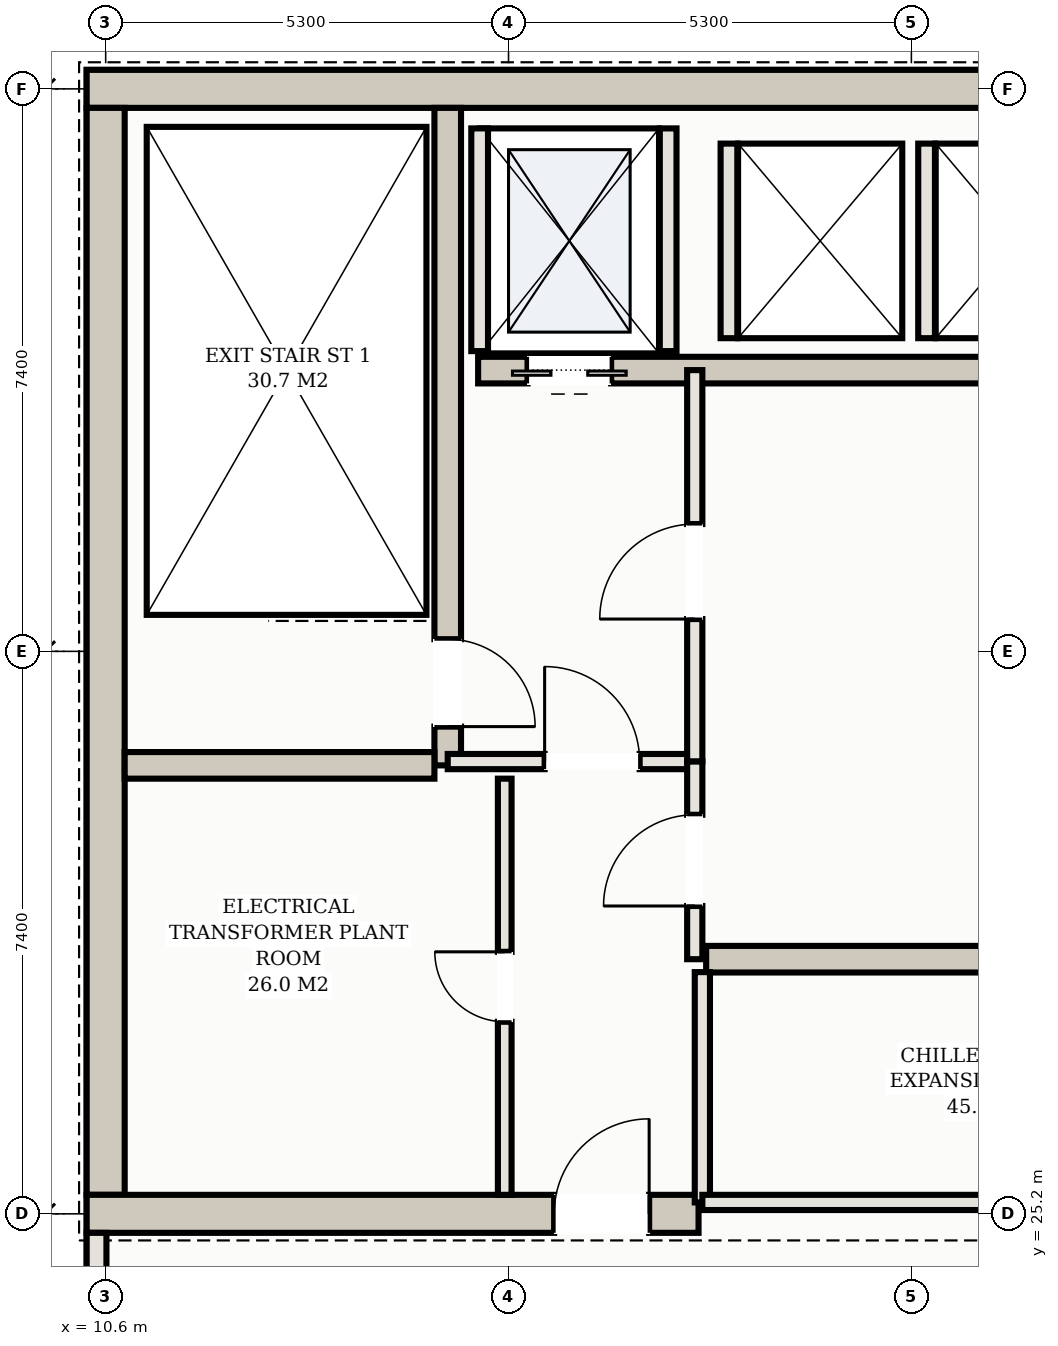
"""IFC4 building model, lengths in metres.
Left out: names, types, materials, properties, quantities, classifications, styles, units other than length and angle.
Written with IfcOpenShell. Run it as: python <this file> out.ifc"""

import sys

from ifc_helpers import new_model, si_unit, direction, frame, frame_2d, origin, place, context, subcontext, project, spatial, rectangle, extrude, element, fill, save


model = new_model("IFC4")
c1 = context("Model", 3, precision=1e-05, world=origin(), true_north=direction((0.0, 1.0)))
c2 = subcontext(c1, "Body", "Model", "MODEL_VIEW")
j1 = project(units=[si_unit("LENGTHUNIT", "METRE"), si_unit("PLANEANGLEUNIT", "RADIAN")], contexts=[c1])
p1 = place(None, origin())
s1 = spatial("IfcSite", under=j1, at=p1, CompositionType="ELEMENT")
p2 = place(p1, origin())
s2 = spatial("IfcBuilding", under=s1, at=p2, CompositionType="ELEMENT")
p3 = place(p2, frame((0.0, 0.0, 270.8)))
s3 = spatial("IfcBuildingStorey", under=s2, at=p3, CompositionType="ELEMENT", Elevation=270.8)
p4 = place(p3, frame((10.35, 40.0, 0.0), z_axis=(0.0, 0.0, 1.0), x_axis=(1.0, 0.0, 0.0)))
e1 = element("IfcWall", 1, at=p4, inside=s3, PredefinedType="SHEAR", context=c2, shape_type="SweptSolid", body=[
    extrude(rectangle(XDim=32.3, YDim=0.5, at=frame_2d((16.15, 0.0))), origin(), (0.0, 0.0, 1.0), 6.177),
])
p5 = place(p3, frame((10.6, 25.45, 0.0), z_axis=(0.0, 0.0, 1.0), x_axis=(0.0, 1.0, 0.0)))
e2 = element("IfcWall", 2, at=p5, inside=s3, PredefinedType="SHEAR", context=c2, shape_type="SweptSolid", body=[
    extrude(rectangle(XDim=14.3, YDim=0.5, at=frame_2d((7.15, 0.0))), origin(), (0.0, 0.0, 1.0), 6.239),
])
p6 = place(p3, frame((10.35, 25.2, 0.0), z_axis=(0.0, 0.0, 1.0), x_axis=(1.0, 0.0, 0.0)))
e3 = element("IfcWall", 3, at=p6, inside=s3, PredefinedType="SHEAR", context=c2, shape_type="SweptSolid", body=[
    extrude(rectangle(XDim=8.05, YDim=0.5, at=frame_2d((4.025, 0.0))), origin(), (0.0, 0.0, 1.0), 6.177),
])
p7 = place(p6, frame((6.15, 0.0, 0.0)))
e4 = element("IfcOpeningElement", 4, at=p7, cuts=e3, PredefinedType="OPENING", context=c2, shape_type="SweptSolid", body=[
    extrude(rectangle(XDim=1.25, YDim=2.2, at=frame_2d((0.625, 1.1))), frame((0.0, 0.26, 0.0), z_axis=(0.0, -1.0, 0.0), x_axis=(1.0, 0.0, 0.0)), (0.0, 0.0, 1.0), 0.52),
])
p8 = place(p3, frame((15.1, 31.1, 0.0), z_axis=(0.0, 0.0, 1.0), x_axis=(0.0, 1.0, 0.0)))
e5 = element("IfcWall", 5, at=p8, inside=s3, PredefinedType="SHEAR", context=c2, shape_type="SweptSolid", body=[
    extrude(rectangle(XDim=8.65, YDim=0.35, at=frame_2d((4.325, 0.0))), origin(), (0.0, 0.0, 1.0), 7.361),
])
p9 = place(p8, frame((0.51, 0.0, 0.0)))
e6 = element("IfcOpeningElement", 6, at=p9, cuts=e5, PredefinedType="OPENING", context=c2, shape_type="SweptSolid", body=[
    extrude(rectangle(XDim=1.15, YDim=2.2, at=frame_2d((0.575, 1.1))), frame((0.0, 0.185, 0.0), z_axis=(0.0, -1.0, 0.0), x_axis=(1.0, 0.0, 0.0)), (0.0, 0.0, 1.0), 0.37),
])
p10 = place(p3, frame((10.85, 31.1, 0.0), z_axis=(0.0, 0.0, 1.0), x_axis=(1.0, 0.0, 0.0)))
e7 = element("IfcWall", 7, at=p10, inside=s3, PredefinedType="SHEAR", context=c2, shape_type="SweptSolid", body=[
    extrude(rectangle(XDim=4.075, YDim=0.35, at=frame_2d((2.038, 0.0))), origin(), (0.0, 0.0, 1.0), 6.302),
])
p11 = place(p3, frame((15.5, 36.3, 0.0), z_axis=(0.0, 0.0, 1.0), x_axis=(1.0, 0.0, 0.0)))
e8 = element("IfcWall", 8, at=p11, inside=s3, PredefinedType="SHEAR", context=c2, shape_type="SweptSolid", body=[
    extrude(rectangle(XDim=22.0, YDim=0.35, at=frame_2d((11.0, 0.0))), origin(), (0.0, 0.0, 1.0), 7.461),
])
p12 = place(p11, frame((0.65, 0.0, 0.0)))
e9 = element("IfcOpeningElement", 9, at=p12, cuts=e8, PredefinedType="OPENING", context=c2, shape_type="SweptSolid", body=[
    extrude(rectangle(XDim=1.1, YDim=2.15, at=frame_2d((0.55, 1.075))), frame((0.0, 0.185, 0.0), z_axis=(0.0, -1.0, 0.0), x_axis=(1.0, 0.0, 0.0)), (0.0, 0.0, 1.0), 0.37),
])
p13 = place(p11, frame((20.25, 0.0, 0.0)))
e10 = element("IfcOpeningElement", 10, at=p13, cuts=e8, PredefinedType="OPENING", context=c2, shape_type="SweptSolid", body=[
    extrude(rectangle(XDim=1.1, YDim=2.15, at=frame_2d((0.55, 1.075))), frame((0.0, 0.185, 0.0), z_axis=(0.0, -1.0, 0.0), x_axis=(1.0, 0.0, 0.0)), (0.0, 0.0, 1.0), 0.37),
])
p14 = place(p11, frame((17.05, 0.0, 0.0)))
e11 = element("IfcOpeningElement", 11, at=p14, cuts=e8, PredefinedType="OPENING", context=c2, shape_type="SweptSolid", body=[
    extrude(rectangle(XDim=1.3, YDim=2.2, at=frame_2d((0.65, 1.1))), frame((0.0, 0.185, 0.0), z_axis=(0.0, -1.0, 0.0), x_axis=(1.0, 0.0, 0.0)), (0.0, 0.0, 1.0), 0.37),
])
p15 = place(p3, frame((18.5, 28.55, 0.0), z_axis=(0.0, 0.0, 1.0), x_axis=(1.0, 0.0, 0.0)))
e12 = element("IfcWall", 12, at=p15, inside=s3, PredefinedType="SHEAR", context=c2, shape_type="SweptSolid", body=[
    extrude(rectangle(XDim=16.0, YDim=0.35, at=frame_2d((8.0, 0.0))), origin(), (0.0, 0.0, 1.0), 8.209),
])
for number, where, z_axis, x_axis in (
    (13, (15.52, 36.55, 0.0), (0.0, 0.0, 1.0), (0.0, 1.0, 0.0)),
    (14, (18.0, 36.55, 0.0), (0.0, 0.0, 1.0), (0.0, 1.0, 0.0)),
):
    element("IfcWall", number, at=place(p3, frame(where, z_axis=z_axis, x_axis=x_axis)), inside=s3, PredefinedType="SOLIDWALL", context=c2, shape_type="SweptSolid", body=[
        extrude(rectangle(XDim=2.93, YDim=0.22, at=frame_2d((1.465, 0.0))), origin(), (0.0, 0.0, 1.0), 7.375),
    ])
p16 = place(p3, frame((18.8, 36.72, 0.0), z_axis=(0.0, 0.0, 1.0), x_axis=(0.0, 1.0, 0.0)))
e15 = element("IfcWall", 15, at=p16, inside=s3, PredefinedType="SOLIDWALL", context=c2, shape_type="SweptSolid", body=[
    extrude(rectangle(XDim=2.56, YDim=0.22, at=frame_2d((1.28, 0.0))), origin(), (0.0, 0.0, 1.0), 8.223),
])
p17 = place(p3, frame((21.4, 36.72, 0.0), z_axis=(0.0, 0.0, 1.0), x_axis=(0.0, 1.0, 0.0)))
e16 = element("IfcWall", 16, at=p17, inside=s3, PredefinedType="SOLIDWALL", context=c2, shape_type="SweptSolid", body=[
    extrude(rectangle(XDim=2.56, YDim=0.22, at=frame_2d((1.28, 0.0))), origin(), (0.0, 0.0, 1.0), 8.871),
])
p18 = place(p3, frame((10.48, 24.95, 0.0), z_axis=(0.0, 0.0, 1.0), x_axis=(0.0, -1.0, 0.0)))
e17 = element("IfcWall", 17, at=p18, inside=s3, PredefinedType="SOLIDWALL", context=c2, shape_type="SweptSolid", body=[
    extrude(rectangle(XDim=7.89, YDim=0.26, at=frame_2d((3.945, 0.0))), origin(), (0.0, 0.0, 1.0), 6.116),
])
p19 = place(p3, frame((15.1, 31.15, 0.0), z_axis=(0.0, 0.0, 1.0), x_axis=(1.0, 0.0, 0.0)))
e18 = element("IfcWall", 18, at=p19, inside=s3, PredefinedType="PARTITIONING", context=c2, shape_type="SweptSolid", body=[
    extrude(rectangle(XDim=3.25, YDim=0.2, at=frame_2d((1.625, 0.0))), origin(), (0.0, 0.0, 1.0), 5.98),
])
p20 = place(p19, frame((1.275, 0.0, 0.0)))
e19 = element("IfcOpeningElement", 19, at=p20, cuts=e18, PredefinedType="OPENING", context=c2, shape_type="SweptSolid", body=[
    extrude(rectangle(XDim=1.25, YDim=2.2, at=frame_2d((0.625, 1.1))), frame((0.0, 0.11, 0.0), z_axis=(0.0, -1.0, 0.0), x_axis=(1.0, 0.0, 0.0)), (0.0, 0.0, 1.0), 0.22),
])
p21 = place(p3, frame((18.35, 31.15, 0.0), z_axis=(0.0, 0.0, 1.0), x_axis=(0.0, 1.0, 0.0)))
e20 = element("IfcWall", 20, at=p21, inside=s3, PredefinedType="PARTITIONING", context=c2, shape_type="SweptSolid", body=[
    extrude(rectangle(XDim=5.15, YDim=0.2, at=frame_2d((2.575, 0.0))), origin(), (0.0, 0.0, 1.0), 5.98),
])
p22 = place(p21, frame((1.875, 0.0, 0.0)))
e21 = element("IfcOpeningElement", 21, at=p22, cuts=e20, PredefinedType="OPENING", context=c2, shape_type="SweptSolid", body=[
    extrude(rectangle(XDim=1.25, YDim=2.2, at=frame_2d((0.625, 1.1))), frame((0.0, 0.11, 0.0), z_axis=(0.0, -1.0, 0.0), x_axis=(1.0, 0.0, 0.0)), (0.0, 0.0, 1.0), 0.22),
])
p23 = place(p3, frame((15.85, 25.45, 0.0), z_axis=(0.0, 0.0, 1.0), x_axis=(0.0, 1.0, 0.0)))
e22 = element("IfcWall", 22, at=p23, inside=s3, PredefinedType="PARTITIONING", context=c2, shape_type="SweptSolid", body=[
    extrude(rectangle(XDim=5.475, YDim=0.18, at=frame_2d((2.738, 0.0))), origin(), (0.0, 0.0, 1.0), 5.98),
])
p24 = place(p23, frame((2.277, 0.0, 0.0)))
e23 = element("IfcOpeningElement", 23, at=p24, cuts=e22, PredefinedType="OPENING", context=c2, shape_type="SweptSolid", body=[
    extrude(rectangle(XDim=0.92, YDim=2.15, at=frame_2d((0.46, 1.075))), frame((0.0, 0.1, 0.0), z_axis=(0.0, -1.0, 0.0), x_axis=(1.0, 0.0, 0.0)), (0.0, 0.0, 1.0), 0.2),
])
p25 = place(p3, frame((18.35, 28.55, 0.0), z_axis=(0.0, 0.0, 1.0), x_axis=(0.0, 1.0, 0.0)))
e24 = element("IfcWall", 24, at=p25, inside=s3, PredefinedType="PARTITIONING", context=c2, shape_type="SweptSolid", body=[
    extrude(rectangle(XDim=2.6, YDim=0.2, at=frame_2d((1.3, 0.0))), origin(), (0.0, 0.0, 1.0), 5.98),
])
p26 = place(p25, frame((0.7, 0.0, 0.0)))
e25 = element("IfcOpeningElement", 25, at=p26, cuts=e24, PredefinedType="OPENING", context=c2, shape_type="SweptSolid", body=[
    extrude(rectangle(XDim=1.2, YDim=2.2, at=frame_2d((0.6, 1.1))), frame((0.0, 0.11, 0.0), z_axis=(0.0, -1.0, 0.0), x_axis=(1.0, 0.0, 0.0)), (0.0, 0.0, 1.0), 0.22),
])
p27 = place(p3, frame((18.45, 25.35, 0.0), z_axis=(0.0, 0.0, 1.0), x_axis=(0.0, 1.0, 0.0)))
e26 = element("IfcWall", 26, at=p27, inside=s3, PredefinedType="PARTITIONING", context=c2, shape_type="SweptSolid", body=[
    extrude(rectangle(XDim=3.03, YDim=0.2, at=frame_2d((1.515, 0.0))), origin(), (0.0, 0.0, 1.0), 3.6),
])
p28 = place(p3, frame((18.45, 25.35, 0.0), z_axis=(0.0, 0.0, 1.0), x_axis=(1.0, 0.0, 0.0)))
e27 = element("IfcWall", 27, at=p28, inside=s3, PredefinedType="PARTITIONING", context=c2, shape_type="SweptSolid", body=[
    extrude(rectangle(XDim=16.1, YDim=0.2, at=frame_2d((8.05, 0.0))), origin(), (0.0, 0.0, 1.0), 3.6),
])
p29 = place(p28, frame((5.7, 0.0, 0.0)))
e28 = element("IfcOpeningElement", 28, at=p29, cuts=e27, PredefinedType="OPENING", context=c2, shape_type="SweptSolid", body=[
    extrude(rectangle(XDim=1.2, YDim=2.2, at=frame_2d((0.6, 1.1))), frame((0.0, 0.11, 0.0), z_axis=(0.0, -1.0, 0.0), x_axis=(1.0, 0.0, 0.0)), (0.0, 0.0, 1.0), 0.22),
])
p30 = place(p12, frame((1.1, 0.0, 0.0), z_axis=(0.0, 0.0, 1.0), x_axis=(-1.0, 0.0, 0.0)))
e29 = element("IfcDoor", 29, at=p30, inside=s3, OperationType="DOUBLE_DOOR_SLIDING", PredefinedType="DOOR", context=c2, shape_type="SweptSolid", body=[
    extrude(rectangle(XDim=1.1, YDim=2.15, at=frame_2d((0.55, 1.075))), frame((0.0, 0.025, 0.0), z_axis=(0.0, -1.0, 0.0), x_axis=(1.0, 0.0, 0.0)), (0.0, 0.0, 1.0), 0.05),
])
fill(e9, e29)
p31 = place(p7, origin())
e30 = element("IfcDoor", 30, at=p31, inside=s3, OperationType="SINGLE_SWING_RIGHT", PredefinedType="DOOR", context=c2, shape_type="SweptSolid", body=[
    extrude(rectangle(XDim=1.25, YDim=2.2, at=frame_2d((0.625, 1.1))), frame((0.0, 0.025, 0.0), z_axis=(0.0, -1.0, 0.0), x_axis=(1.0, 0.0, 0.0)), (0.0, 0.0, 1.0), 0.05),
])
fill(e4, e30)
p32 = place(p20, origin())
e31 = element("IfcDoor", 31, at=p32, inside=s3, OperationType="SINGLE_SWING_LEFT", PredefinedType="DOOR", context=c2, shape_type="SweptSolid", body=[
    extrude(rectangle(XDim=1.25, YDim=2.2, at=frame_2d((0.625, 1.1))), frame((0.0, 0.025, 0.0), z_axis=(0.0, -1.0, 0.0), x_axis=(1.0, 0.0, 0.0)), (0.0, 0.0, 1.0), 0.05),
])
fill(e19, e31)
p33 = place(p22, origin())
e32 = element("IfcDoor", 32, at=p33, inside=s3, OperationType="SINGLE_SWING_LEFT", PredefinedType="DOOR", context=c2, shape_type="SweptSolid", body=[
    extrude(rectangle(XDim=1.25, YDim=2.2, at=frame_2d((0.625, 1.1))), frame((0.0, 0.025, 0.0), z_axis=(0.0, -1.0, 0.0), x_axis=(1.0, 0.0, 0.0)), (0.0, 0.0, 1.0), 0.05),
])
fill(e21, e32)
p34 = place(p9, frame((1.15, 0.0, 0.0), z_axis=(0.0, 0.0, 1.0), x_axis=(-1.0, 0.0, 0.0)))
e33 = element("IfcDoor", 33, at=p34, inside=s3, OperationType="SINGLE_SWING_RIGHT", PredefinedType="DOOR", context=c2, shape_type="SweptSolid", body=[
    extrude(rectangle(XDim=1.15, YDim=2.2, at=frame_2d((0.575, 1.1))), frame((0.0, 0.025, 0.0), z_axis=(0.0, -1.0, 0.0), x_axis=(1.0, 0.0, 0.0)), (0.0, 0.0, 1.0), 0.05),
])
fill(e6, e33)
p35 = place(p24, origin())
e34 = element("IfcDoor", 34, at=p35, inside=s3, OperationType="SINGLE_SWING_RIGHT", PredefinedType="DOOR", context=c2, shape_type="SweptSolid", body=[
    extrude(rectangle(XDim=0.92, YDim=2.15, at=frame_2d((0.46, 1.075))), frame((0.0, 0.025, 0.0), z_axis=(0.0, -1.0, 0.0), x_axis=(1.0, 0.0, 0.0)), (0.0, 0.0, 1.0), 0.05),
])
fill(e23, e34)
p36 = place(p26, origin())
e35 = element("IfcDoor", 35, at=p36, inside=s3, OperationType="SINGLE_SWING_LEFT", PredefinedType="DOOR", context=c2, shape_type="SweptSolid", body=[
    extrude(rectangle(XDim=1.2, YDim=2.2, at=frame_2d((0.6, 1.1))), frame((0.0, 0.025, 0.0), z_axis=(0.0, -1.0, 0.0), x_axis=(1.0, 0.0, 0.0)), (0.0, 0.0, 1.0), 0.05),
])
fill(e25, e35)
save(model, sys.argv[1])
